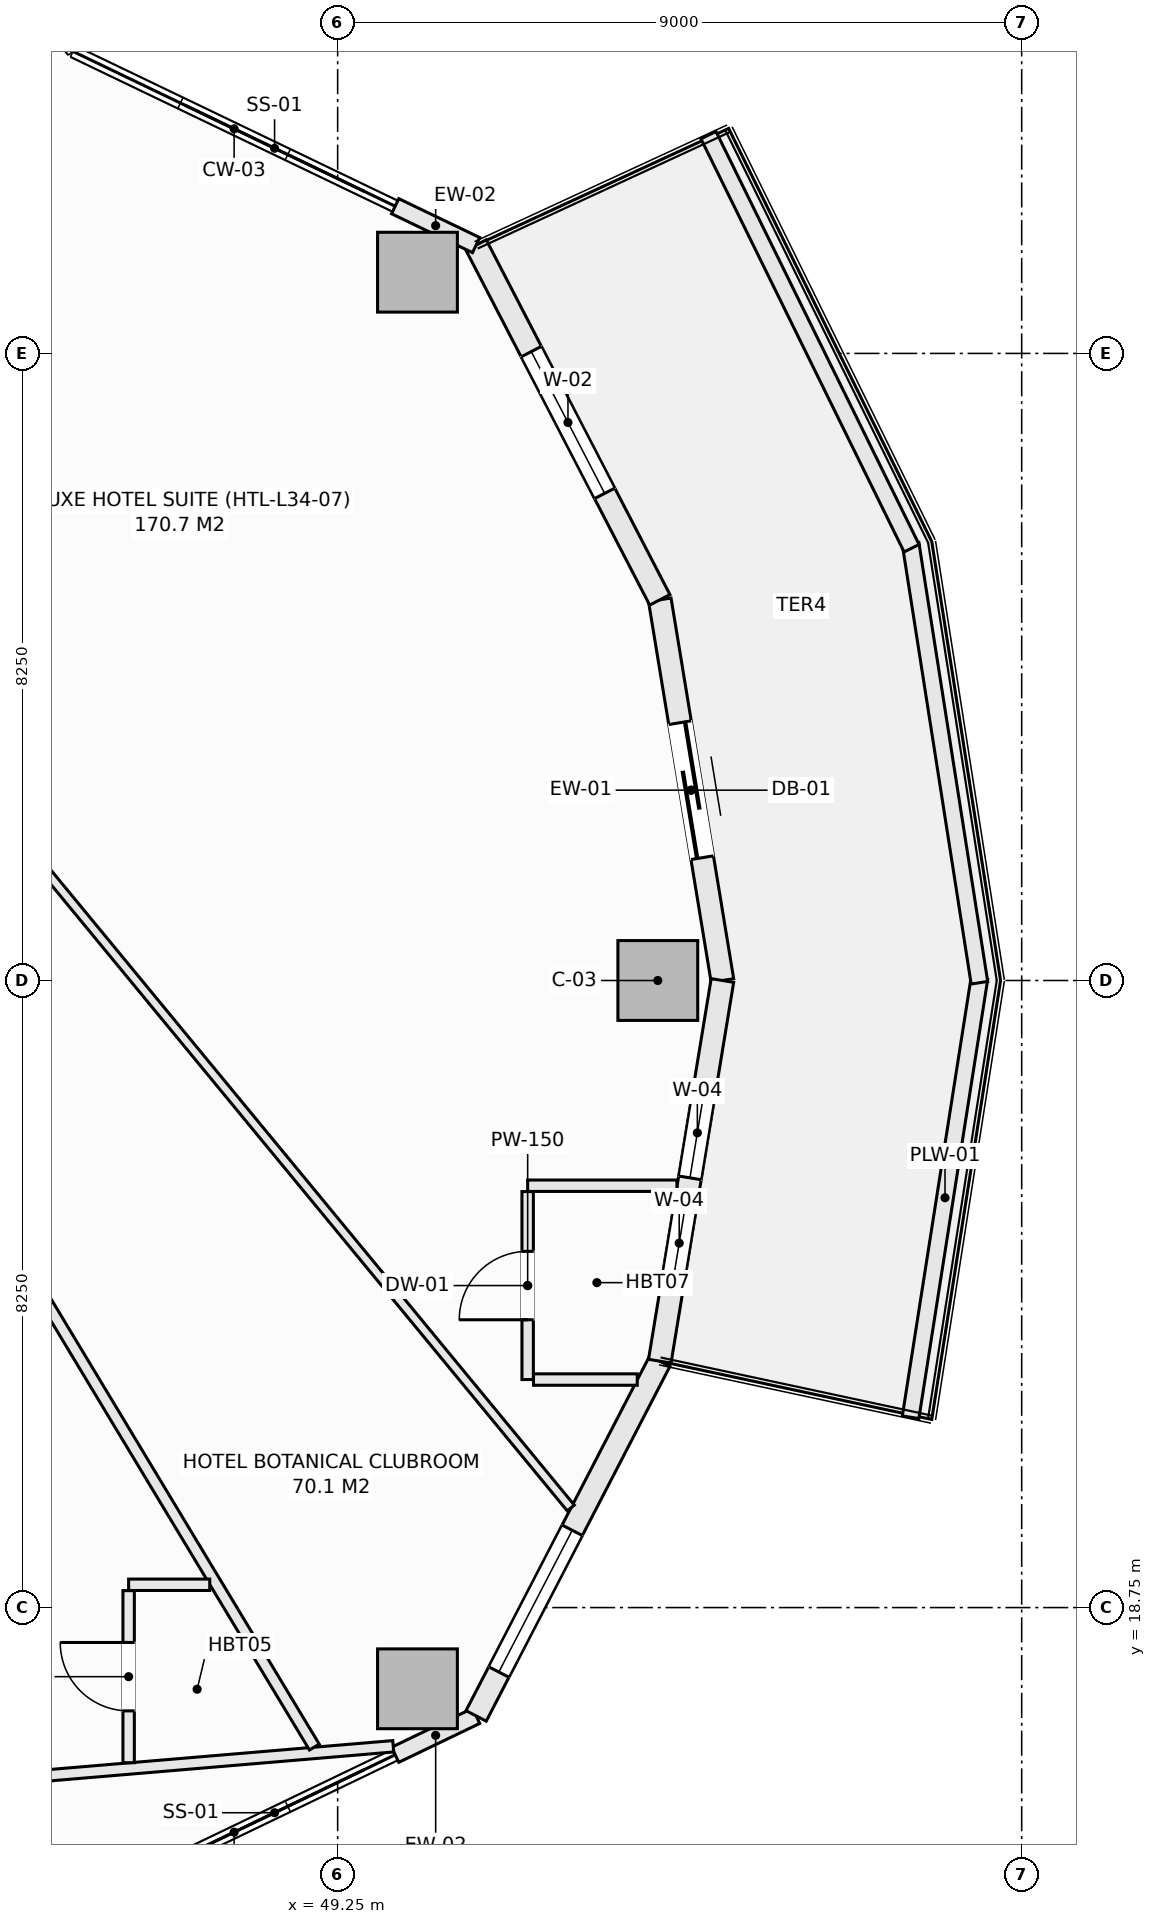
"""IFC4 building model, lengths in metres.
Left out: names, types, materials, properties, quantities, classifications, styles, units other than length and angle.
Written with IfcOpenShell. Run it as: python <this file> out.ifc"""

import sys

from ifc_helpers import new_model, si_unit, direction, frame, frame_2d, origin, origin_2d, place, context, subcontext, project, spatial, rectangle, extrude, element, fill, save


model = new_model("IFC4")
c1 = context("Model", 3, precision=1e-05, world=origin(), true_north=direction((0.0, 1.0)))
c2 = subcontext(c1, "Body", "Model", "MODEL_VIEW")
j1 = project(units=[si_unit("LENGTHUNIT", "METRE"), si_unit("PLANEANGLEUNIT", "RADIAN")], contexts=[c1])
p1 = place(None, origin())
s1 = spatial("IfcSite", under=j1, at=p1, CompositionType="ELEMENT")
p2 = place(p1, origin())
s2 = spatial("IfcBuilding", under=s1, at=p2, CompositionType="ELEMENT")
p3 = place(p2, frame((0.0, 0.0, 135.9)))
s3 = spatial("IfcBuildingStorey", under=s2, at=p3, CompositionType="ELEMENT", Elevation=135.9)
for number, where, z_axis, x_axis in (
    (1, (53.462, 27.0, -0.27), (0.0, 0.0, 1.0), (1.0, 0.0, 0.0)),
    (2, (50.3, 36.319, -0.27), (0.0, 0.0, 1.0), (1.0, 0.0, 0.0)),
    (3, (50.3, 17.681, -0.27), (0.0, 0.0, 1.0), (1.0, 0.0, 0.0)),
):
    element("IfcColumn", number, at=place(p3, frame(where, z_axis=z_axis, x_axis=x_axis)), inside=s3, PredefinedType="COLUMN", context=c2, shape_type="SweptSolid", body=[
        extrude(rectangle(XDim=1.05, YDim=1.05, at=origin_2d()), origin(), (0.0, 0.0, 1.0), 3.4),
    ])
p4 = place(p3, frame((53.488, 32.008, 0.0), z_axis=(0.0, 0.0, 1.0), x_axis=(0.162393944769, -0.986726003864, 0.0)))
e4 = element("IfcWall", 4, at=p4, inside=s3, PredefinedType="SOLIDWALL", context=c2, shape_type="SweptSolid", body=[
    extrude(rectangle(XDim=5.075, YDim=0.3, at=frame_2d((2.538, 0.0))), origin(), (0.0, 0.0, 1.0), 2.653),
])
p5 = place(p4, frame((1.638, 0.0, 0.0)))
e5 = element("IfcOpeningElement", 5, at=p5, cuts=e4, PredefinedType="OPENING", context=c2, shape_type="SweptSolid", body=[
    extrude(rectangle(XDim=1.8, YDim=2.25, at=frame_2d((0.9, 1.125))), frame((0.0, 0.16, 0.0), z_axis=(0.0, -1.0, 0.0), x_axis=(1.0, 0.0, 0.0)), (0.0, 0.0, 1.0), 0.32),
])
p6 = place(p3, frame((51.072, 36.675, 0.0), z_axis=(0.0, 0.0, 1.0), x_axis=(0.459767899643, -0.888039119892, 0.0)))
e6 = element("IfcWall", 6, at=p6, inside=s3, PredefinedType="SOLIDWALL", context=c2, shape_type="SweptSolid", body=[
    extrude(rectangle(XDim=5.255, YDim=0.3, at=frame_2d((2.628, 0.0))), origin(), (0.0, 0.0, 1.0), 2.653),
])
p7 = place(p6, frame((1.578, 0.0, 0.74)))
e7 = element("IfcOpeningElement", 7, at=p7, cuts=e6, PredefinedType="OPENING", context=c2, shape_type="SweptSolid", body=[
    extrude(rectangle(XDim=2.1, YDim=1.7, at=frame_2d((1.05, 0.85))), frame((0.0, 0.16, 0.0), z_axis=(0.0, -1.0, 0.0), x_axis=(1.0, 0.0, 0.0)), (0.0, 0.0, 1.0), 0.32),
])
for number, where, z_axis, x_axis in (
    (8, (50.007, 37.187, 0.0), (0.0, 0.0, 1.0), (0.901, -0.433, 0.0)),
    (9, (50.007, 16.813, 0.0), (0.0, 0.0, 1.0), (0.901, 0.433, 0.0)),
):
    element("IfcWall", number, at=place(p3, frame(where, z_axis=z_axis, x_axis=x_axis)), inside=s3, PredefinedType="SOLIDWALL", context=c2, shape_type="SweptSolid", body=[
        extrude(rectangle(XDim=1.182, YDim=0.22, at=frame_2d((0.591, 0.0))), origin(), (0.0, 0.0, 1.0), 2.653),
    ])
p8 = place(p3, frame((51.072, 17.325, 0.0), z_axis=(0.0, 0.0, 1.0), x_axis=(0.459767899643, 0.888039119892, 0.0)))
e10 = element("IfcWall", 10, at=p8, inside=s3, PredefinedType="SOLIDWALL", context=c2, shape_type="SweptSolid", body=[
    extrude(rectangle(XDim=5.255, YDim=0.3, at=frame_2d((2.628, 0.0))), origin(), (0.0, 0.0, 1.0), 2.653),
])
p9 = place(p8, frame((0.65, 0.0, 0.74)))
e11 = element("IfcOpeningElement", 11, at=p9, cuts=e10, PredefinedType="OPENING", context=c2, shape_type="SweptSolid", body=[
    extrude(rectangle(XDim=2.1, YDim=1.7, at=frame_2d((1.05, 0.85))), frame((0.0, 0.16, 0.0), z_axis=(0.0, -1.0, 0.0), x_axis=(1.0, 0.0, 0.0)), (0.0, 0.0, 1.0), 0.32),
])
p10 = place(p3, frame((53.488, 21.992, 0.0), z_axis=(0.0, 0.0, 1.0), x_axis=(0.162393944769, 0.986726003864, 0.0)))
e12 = element("IfcWall", 12, at=p10, inside=s3, PredefinedType="SOLIDWALL", context=c2, shape_type="SweptSolid", body=[
    extrude(rectangle(XDim=5.075, YDim=0.3, at=frame_2d((2.538, 0.0))), origin(), (0.0, 0.0, 1.0), 2.653),
])
p11 = place(p10, frame((0.974, 0.0, 0.74)))
e13 = element("IfcOpeningElement", 13, at=p11, cuts=e12, PredefinedType="OPENING", context=c2, shape_type="SweptSolid", body=[
    extrude(rectangle(XDim=1.2, YDim=1.7, at=frame_2d((0.6, 0.85))), frame((0.0, 0.16, 0.0), z_axis=(0.0, -1.0, 0.0), x_axis=(1.0, 0.0, 0.0)), (0.0, 0.0, 1.0), 0.32),
])
p12 = place(p10, frame((2.444, 0.0, 0.74)))
e14 = element("IfcOpeningElement", 14, at=p12, cuts=e12, PredefinedType="OPENING", context=c2, shape_type="SweptSolid", body=[
    extrude(rectangle(XDim=1.2, YDim=1.7, at=frame_2d((0.6, 0.85))), frame((0.0, 0.16, 0.0), z_axis=(0.0, -1.0, 0.0), x_axis=(1.0, 0.0, 0.0)), (0.0, 0.0, 1.0), 0.32),
])
for number, where, z_axis, x_axis in (
    (15, (56.789, 21.254, 0.0), (0.0, 0.0, 1.0), (0.155, 0.988, 0.0)),
    (16, (56.789, 32.746, 0.0), (0.0, 0.0, 1.0), (0.155, -0.988, 0.0)),
):
    element("IfcWall", number, at=place(p3, frame(where, z_axis=z_axis, x_axis=x_axis)), inside=s3, PredefinedType="PARAPET", context=c2, shape_type="SweptSolid", body=[
        extrude(rectangle(XDim=5.846, YDim=0.22, at=frame_2d((2.923, 0.0))), origin(), (0.0, 0.0, 1.0), 0.52),
    ])
p13 = place(p3, frame((54.129, 38.122, 0.0), z_axis=(0.0, 0.0, 1.0), x_axis=(0.441269631716, -0.897374566235, 0.0)))
e17 = element("IfcWall", 17, at=p13, inside=s3, PredefinedType="PARAPET", context=c2, shape_type="SweptSolid", body=[
    extrude(rectangle(XDim=6.056, YDim=0.22, at=frame_2d((3.028, 0.0))), origin(), (0.0, 0.0, 1.0), 0.52),
])
p14 = place(p3, frame((39.082, 16.007, 0.0), z_axis=(0.0, 0.0, 1.0), x_axis=(0.996466495788, 0.083991206515, 0.0)))
e18 = element("IfcWall", 18, at=p14, inside=s3, PredefinedType="PARTITIONING", context=c2, shape_type="SweptSolid", body=[
    extrude(rectangle(XDim=10.938, YDim=0.15, at=frame_2d((5.469, 0.0))), origin(), (0.0, 0.0, 1.0), 2.653),
])
p15 = place(p3, frame((38.892, 33.597, 0.0), z_axis=(0.0, 0.0, 1.0), x_axis=(0.516074687683, -0.856543587176, 0.0)))
e19 = element("IfcWall", 19, at=p15, inside=s3, PredefinedType="PARTITIONING", context=c2, shape_type="SweptSolid", body=[
    extrude(rectangle(XDim=19.476, YDim=0.15, at=frame_2d((9.738, 0.0))), origin(), (0.0, 0.0, 1.0), 2.505),
])
p16 = place(p3, frame((46.5, 19.05, 0.0), z_axis=(0.0, 0.0, 1.0), x_axis=(1.0, 0.0, 0.0)))
e20 = element("IfcWall", 20, at=p16, inside=s3, PredefinedType="PARTITIONING", context=c2, shape_type="SweptSolid", body=[
    extrude(rectangle(XDim=1.067, YDim=0.15, at=frame_2d((0.534, 0.0))), origin(), (0.0, 0.0, 1.0), 2.812),
])
p17 = place(p3, frame((46.5, 16.709, 0.0), z_axis=(0.0, 0.0, 1.0), x_axis=(0.0, 1.0, 0.0)))
e21 = element("IfcWall", 21, at=p17, inside=s3, PredefinedType="PARTITIONING", context=c2, shape_type="SweptSolid", body=[
    extrude(rectangle(XDim=2.264, YDim=0.15, at=frame_2d((1.132, 0.0))), origin(), (0.0, 0.0, 1.0), 3.13),
])
p18 = place(p17, frame((0.682, 0.0, 0.0)))
e22 = element("IfcOpeningElement", 22, at=p18, cuts=e21, PredefinedType="OPENING", context=c2, shape_type="SweptSolid", body=[
    extrude(rectangle(XDim=0.9, YDim=2.1, at=frame_2d((0.45, 1.05))), frame((0.0, 0.085, 0.0), z_axis=(0.0, -1.0, 0.0), x_axis=(1.0, 0.0, 0.0)), (0.0, 0.0, 1.0), 0.17),
])
p19 = place(p3, frame((35.479, 40.488, 0.0), z_axis=(0.0, 0.0, 1.0), x_axis=(0.636055982797, -0.771642914014, 0.0)))
e23 = element("IfcWall", 23, at=p19, inside=s3, PredefinedType="PARTITIONING", context=c2, shape_type="SweptSolid", body=[
    extrude(rectangle(XDim=26.473, YDim=0.12, at=frame_2d((13.236, 0.0))), origin(), (0.0, 0.0, 1.0), 2.812),
])
p20 = place(p3, frame((51.75, 24.3, 0.0), z_axis=(0.0, 0.0, 1.0), x_axis=(1.0, 0.0, 0.0)))
e24 = element("IfcWall", 24, at=p20, inside=s3, PredefinedType="PARTITIONING", context=c2, shape_type="SweptSolid", body=[
    extrude(rectangle(XDim=1.964, YDim=0.15, at=frame_2d((0.982, 0.0))), origin(), (0.0, 0.0, 1.0), 3.13),
])
p21 = place(p3, frame((51.75, 21.75, 0.0), z_axis=(0.0, 0.0, 1.0), x_axis=(0.0, 1.0, 0.0)))
e25 = element("IfcWall", 25, at=p21, inside=s3, PredefinedType="PARTITIONING", context=c2, shape_type="SweptSolid", body=[
    extrude(rectangle(XDim=2.473, YDim=0.15, at=frame_2d((1.236, 0.0))), origin(), (0.0, 0.0, 1.0), 2.653),
])
p22 = place(p21, frame((0.787, 0.0, 0.0)))
e26 = element("IfcOpeningElement", 26, at=p22, cuts=e25, PredefinedType="OPENING", context=c2, shape_type="SweptSolid", body=[
    extrude(rectangle(XDim=0.9, YDim=2.1, at=frame_2d((0.45, 1.05))), frame((0.0, 0.085, 0.0), z_axis=(0.0, -1.0, 0.0), x_axis=(1.0, 0.0, 0.0)), (0.0, 0.0, 1.0), 0.17),
])
p23 = place(p3, frame((51.827, 21.75, 0.0), z_axis=(0.0, 0.0, 1.0), x_axis=(1.0, 0.0, 0.0)))
e27 = element("IfcWall", 27, at=p23, inside=s3, PredefinedType="PARTITIONING", context=c2, shape_type="SweptSolid", body=[
    extrude(rectangle(XDim=1.365, YDim=0.15, at=frame_2d((0.683, 0.0))), origin(), (0.0, 0.0, 1.0), 3.13),
])
p24 = place(p5, origin())
e28 = element("IfcDoor", 28, at=p24, inside=s3, OperationType="SLIDING_TO_LEFT", PredefinedType="DOOR", context=c2, shape_type="SweptSolid", body=[
    extrude(rectangle(XDim=1.8, YDim=2.25, at=frame_2d((0.9, 1.125))), frame((0.0, 0.025, 0.0), z_axis=(0.0, -1.0, 0.0), x_axis=(1.0, 0.0, 0.0)), (0.0, 0.0, 1.0), 0.05),
])
fill(e5, e28)
p25 = place(p7, origin())
e29 = element("IfcWindow", 29, at=p25, inside=s3, PartitioningType="SINGLE_PANEL", PredefinedType="WINDOW", context=c2, shape_type="SweptSolid", body=[
    extrude(rectangle(XDim=2.1, YDim=1.7, at=frame_2d((1.05, 0.85))), frame((0.0, 0.03, 0.0), z_axis=(0.0, -1.0, 0.0), x_axis=(1.0, 0.0, 0.0)), (0.0, 0.0, 1.0), 0.06),
])
fill(e7, e29)
p26 = place(p9, origin())
e30 = element("IfcWindow", 30, at=p26, inside=s3, PartitioningType="SINGLE_PANEL", PredefinedType="WINDOW", context=c2, shape_type="SweptSolid", body=[
    extrude(rectangle(XDim=2.1, YDim=1.7, at=frame_2d((1.05, 0.85))), frame((0.0, 0.03, 0.0), z_axis=(0.0, -1.0, 0.0), x_axis=(1.0, 0.0, 0.0)), (0.0, 0.0, 1.0), 0.06),
])
fill(e11, e30)
p27 = place(p11, origin())
e31 = element("IfcWindow", 31, at=p27, inside=s3, PartitioningType="SINGLE_PANEL", PredefinedType="WINDOW", context=c2, shape_type="SweptSolid", body=[
    extrude(rectangle(XDim=1.2, YDim=1.7, at=frame_2d((0.6, 0.85))), frame((0.0, 0.03, 0.0), z_axis=(0.0, -1.0, 0.0), x_axis=(1.0, 0.0, 0.0)), (0.0, 0.0, 1.0), 0.06),
])
fill(e13, e31)
p28 = place(p18, origin())
e32 = element("IfcDoor", 32, at=p28, inside=s3, OperationType="SINGLE_SWING_RIGHT", PredefinedType="DOOR", context=c2, shape_type="SweptSolid", body=[
    extrude(rectangle(XDim=0.9, YDim=2.1, at=frame_2d((0.45, 1.05))), frame((0.0, 0.025, 0.0), z_axis=(0.0, -1.0, 0.0), x_axis=(1.0, 0.0, 0.0)), (0.0, 0.0, 1.0), 0.05),
])
fill(e22, e32)
p29 = place(p22, origin())
e33 = element("IfcDoor", 33, at=p29, inside=s3, OperationType="SINGLE_SWING_LEFT", PredefinedType="DOOR", context=c2, shape_type="SweptSolid", body=[
    extrude(rectangle(XDim=0.9, YDim=2.1, at=frame_2d((0.45, 1.05))), frame((0.0, 0.025, 0.0), z_axis=(0.0, -1.0, 0.0), x_axis=(1.0, 0.0, 0.0)), (0.0, 0.0, 1.0), 0.05),
])
fill(e26, e33)
p30 = place(p12, origin())
e34 = element("IfcWindow", 34, at=p30, inside=s3, PartitioningType="SINGLE_PANEL", PredefinedType="WINDOW", context=c2, shape_type="SweptSolid", body=[
    extrude(rectangle(XDim=1.2, YDim=1.7, at=frame_2d((0.6, 0.85))), frame((0.0, 0.03, 0.0), z_axis=(0.0, -1.0, 0.0), x_axis=(1.0, 0.0, 0.0)), (0.0, 0.0, 1.0), 0.06),
])
fill(e14, e34)
save(model, sys.argv[1])
